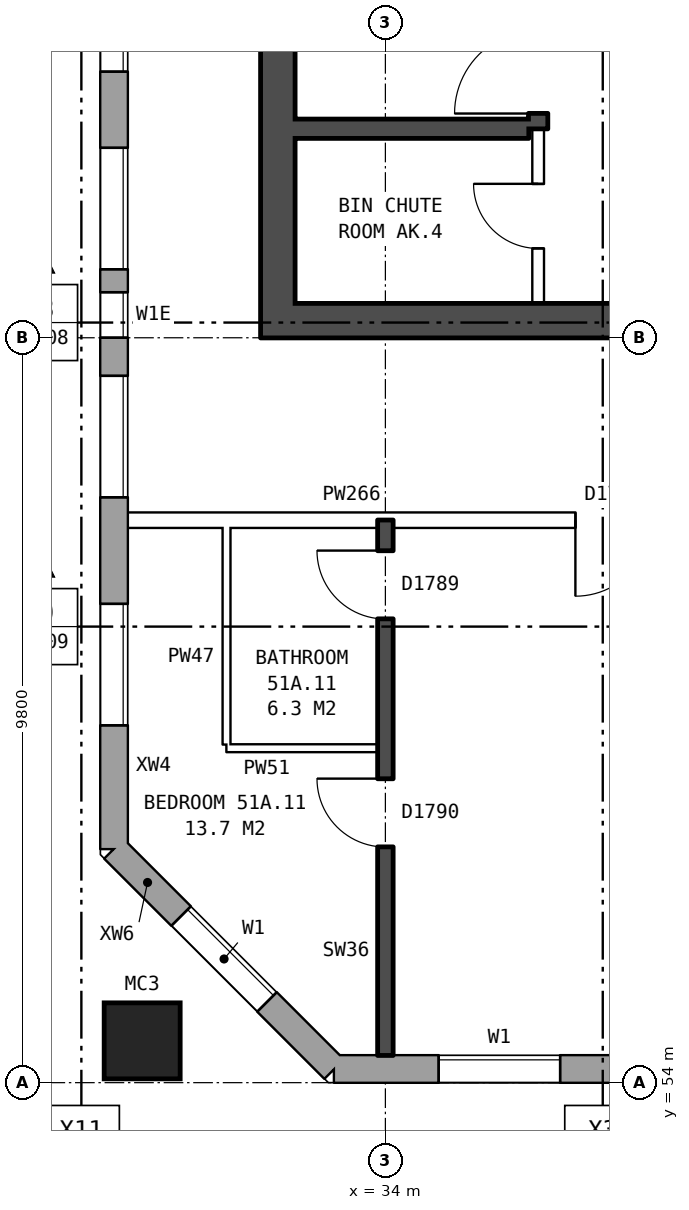
"""IFC4 building model, lengths in metres.
Left out: names, types, materials, properties, quantities, classifications, styles, units other than length and angle.
Written with IfcOpenShell. Run it as: python <this file> out.ifc"""

import sys

from ifc_helpers import new_model, si_unit, direction, frame, frame_2d, origin, origin_2d, place, context, subcontext, project, spatial, rectangle, hollow_rectangle, extrude, element, fill, save


model = new_model("IFC4")
c1 = context("Model", 3, precision=1e-05, world=origin(), true_north=direction((0.0, 1.0)))
c2 = subcontext(c1, "Body", "Model", "MODEL_VIEW")
j1 = project(units=[si_unit("LENGTHUNIT", "METRE"), si_unit("PLANEANGLEUNIT", "RADIAN")], contexts=[c1])
p1 = place(None, origin())
s1 = spatial("IfcSite", under=j1, at=p1, CompositionType="ELEMENT")
p2 = place(p1, origin())
s2 = spatial("IfcBuilding", under=s1, at=p2, CompositionType="ELEMENT")
p3 = place(p2, frame((0.0, 0.0, 182.0)))
s3 = spatial("IfcBuildingStorey", under=s2, at=p3, CompositionType="ELEMENT", Elevation=182.0)
p4 = place(p3, frame((30.8, 54.55, 0.0), z_axis=(0.0, 0.0, 1.0), x_axis=(1.0, 0.0, 0.0)))
e1 = element("IfcColumn", 1, at=p4, inside=s3, PredefinedType="COLUMN", context=c2, shape_type="SweptSolid", body=[
    extrude(hollow_rectangle(XDim=1.0, YDim=1.0, WallThickness=0.055, at=origin_2d()), origin(), (0.0, 0.0, 1.0), 3.1),
])
p5 = place(p3, frame((30.43, 57.075, 0.0), z_axis=(0.0, 0.0, 1.0), x_axis=(0.707106781187, -0.707106781187, 0.0)))
e2 = element("IfcWall", 2, at=p5, inside=s3, PredefinedType="STANDARD", context=c2, shape_type="SweptSolid", body=[
    extrude(rectangle(XDim=4.094, YDim=0.36, at=frame_2d((2.047, 0.0))), origin(), (0.0, 0.0, 1.0), 2.85),
])
p6 = place(p5, frame((1.247, 0.0, 0.8)))
e3 = element("IfcOpeningElement", 3, at=p6, cuts=e2, PredefinedType="OPENING", context=c2, shape_type="SweptSolid", body=[
    extrude(rectangle(XDim=1.6, YDim=1.8, at=frame_2d((0.8, 0.9))), frame((0.0, 0.19, 0.0), z_axis=(0.0, -1.0, 0.0), x_axis=(1.0, 0.0, 0.0)), (0.0, 0.0, 1.0), 0.38),
])
p7 = place(p3, frame((33.325, 54.18, 0.0), z_axis=(0.0, 0.0, 1.0), x_axis=(1.0, 0.0, 0.0)))
e4 = element("IfcWall", 4, at=p7, inside=s3, PredefinedType="STANDARD", context=c2, shape_type="SweptSolid", body=[
    extrude(rectangle(XDim=39.601, YDim=0.36, at=frame_2d((19.8, 0.0))), origin(), (0.0, 0.0, 1.0), 2.85),
])
p8 = place(p7, frame((1.375, 0.0, 0.8)))
e5 = element("IfcOpeningElement", 5, at=p8, cuts=e4, PredefinedType="OPENING", context=c2, shape_type="SweptSolid", body=[
    extrude(rectangle(XDim=1.6, YDim=1.8, at=frame_2d((0.8, 0.9))), frame((0.0, 0.19, 0.0), z_axis=(0.0, -1.0, 0.0), x_axis=(1.0, 0.0, 0.0)), (0.0, 0.0, 1.0), 0.38),
])
p9 = place(p7, frame((4.375, 0.0, 0.8)))
e6 = element("IfcOpeningElement", 6, at=p9, cuts=e4, PredefinedType="OPENING", context=c2, shape_type="SweptSolid", body=[
    extrude(rectangle(XDim=1.6, YDim=1.8, at=frame_2d((0.8, 0.9))), frame((0.0, 0.19, 0.0), z_axis=(0.0, -1.0, 0.0), x_axis=(1.0, 0.0, 0.0)), (0.0, 0.0, 1.0), 0.38),
])
p10 = place(p7, frame((6.875, 0.0, 0.8)))
e7 = element("IfcOpeningElement", 7, at=p10, cuts=e4, PredefinedType="OPENING", context=c2, shape_type="SweptSolid", body=[
    extrude(rectangle(XDim=1.0, YDim=1.8, at=frame_2d((0.5, 0.9))), frame((0.0, 0.19, 0.0), z_axis=(0.0, -1.0, 0.0), x_axis=(1.0, 0.0, 0.0)), (0.0, 0.0, 1.0), 0.38),
])
p11 = place(p7, frame((8.175, 0.0, 1.7)))
e8 = element("IfcOpeningElement", 8, at=p11, cuts=e4, PredefinedType="OPENING", context=c2, shape_type="SweptSolid", body=[
    extrude(rectangle(XDim=0.6, YDim=0.9, at=frame_2d((0.3, 0.45))), frame((0.0, 0.19, 0.0), z_axis=(0.0, -1.0, 0.0), x_axis=(1.0, 0.0, 0.0)), (0.0, 0.0, 1.0), 0.38),
])
p12 = place(p7, frame((13.375, 0.0, 0.8)))
e9 = element("IfcOpeningElement", 9, at=p12, cuts=e4, PredefinedType="OPENING", context=c2, shape_type="SweptSolid", body=[
    extrude(rectangle(XDim=1.6, YDim=1.8, at=frame_2d((0.8, 0.9))), frame((0.0, 0.19, 0.0), z_axis=(0.0, -1.0, 0.0), x_axis=(1.0, 0.0, 0.0)), (0.0, 0.0, 1.0), 0.38),
])
p13 = place(p7, frame((16.375, 0.0, 0.8)))
e10 = element("IfcOpeningElement", 10, at=p13, cuts=e4, PredefinedType="OPENING", context=c2, shape_type="SweptSolid", body=[
    extrude(rectangle(XDim=1.6, YDim=1.8, at=frame_2d((0.8, 0.9))), frame((0.0, 0.19, 0.0), z_axis=(0.0, -1.0, 0.0), x_axis=(1.0, 0.0, 0.0)), (0.0, 0.0, 1.0), 0.38),
])
p14 = place(p7, frame((19.375, 0.0, 0.8)))
e11 = element("IfcOpeningElement", 11, at=p14, cuts=e4, PredefinedType="OPENING", context=c2, shape_type="SweptSolid", body=[
    extrude(rectangle(XDim=1.6, YDim=1.8, at=frame_2d((0.8, 0.9))), frame((0.0, 0.19, 0.0), z_axis=(0.0, -1.0, 0.0), x_axis=(1.0, 0.0, 0.0)), (0.0, 0.0, 1.0), 0.38),
])
p15 = place(p7, frame((22.375, 0.0, 0.8)))
e12 = element("IfcOpeningElement", 12, at=p15, cuts=e4, PredefinedType="OPENING", context=c2, shape_type="SweptSolid", body=[
    extrude(rectangle(XDim=1.6, YDim=1.8, at=frame_2d((0.8, 0.9))), frame((0.0, 0.19, 0.0), z_axis=(0.0, -1.0, 0.0), x_axis=(1.0, 0.0, 0.0)), (0.0, 0.0, 1.0), 0.38),
])
p16 = place(p7, frame((25.375, 0.0, 0.8)))
e13 = element("IfcOpeningElement", 13, at=p16, cuts=e4, PredefinedType="OPENING", context=c2, shape_type="SweptSolid", body=[
    extrude(rectangle(XDim=1.6, YDim=1.8, at=frame_2d((0.8, 0.9))), frame((0.0, 0.19, 0.0), z_axis=(0.0, -1.0, 0.0), x_axis=(1.0, 0.0, 0.0)), (0.0, 0.0, 1.0), 0.38),
])
p17 = place(p7, frame((27.825, 0.0, 0.35)))
e14 = element("IfcOpeningElement", 14, at=p17, cuts=e4, PredefinedType="OPENING", context=c2, shape_type="SweptSolid", body=[
    extrude(rectangle(XDim=1.4, YDim=1.8, at=frame_2d((0.7, 0.9))), frame((0.0, 0.19, 0.0), z_axis=(0.0, -1.0, 0.0), x_axis=(1.0, 0.0, 0.0)), (0.0, 0.0, 1.0), 0.38),
])
p18 = place(p7, frame((31.375, 0.0, 0.8)))
e15 = element("IfcOpeningElement", 15, at=p18, cuts=e4, PredefinedType="OPENING", context=c2, shape_type="SweptSolid", body=[
    extrude(rectangle(XDim=1.6, YDim=1.8, at=frame_2d((0.8, 0.9))), frame((0.0, 0.19, 0.0), z_axis=(0.0, -1.0, 0.0), x_axis=(1.0, 0.0, 0.0)), (0.0, 0.0, 1.0), 0.38),
])
p19 = place(p7, frame((34.375, 0.0, 0.8)))
e16 = element("IfcOpeningElement", 16, at=p19, cuts=e4, PredefinedType="OPENING", context=c2, shape_type="SweptSolid", body=[
    extrude(rectangle(XDim=1.6, YDim=1.8, at=frame_2d((0.8, 0.9))), frame((0.0, 0.19, 0.0), z_axis=(0.0, -1.0, 0.0), x_axis=(1.0, 0.0, 0.0)), (0.0, 0.0, 1.0), 0.38),
])
p20 = place(p7, frame((37.375, 0.0, 0.8)))
e17 = element("IfcOpeningElement", 17, at=p20, cuts=e4, PredefinedType="OPENING", context=c2, shape_type="SweptSolid", body=[
    extrude(rectangle(XDim=1.6, YDim=1.8, at=frame_2d((0.8, 0.9))), frame((0.0, 0.19, 0.0), z_axis=(0.0, -1.0, 0.0), x_axis=(1.0, 0.0, 0.0)), (0.0, 0.0, 1.0), 0.38),
])
p21 = place(p7, frame((9.925, 0.0, 0.8)))
e18 = element("IfcOpeningElement", 18, at=p21, cuts=e4, PredefinedType="OPENING", context=c2, shape_type="SweptSolid", body=[
    extrude(rectangle(XDim=0.6, YDim=0.9, at=frame_2d((0.3, 0.45))), frame((0.0, 0.19, 0.0), z_axis=(0.0, -1.0, 0.0), x_axis=(1.0, 0.0, 0.0)), (0.0, 0.0, 1.0), 0.38),
])
p22 = place(p7, frame((10.875, 0.0, 0.8)))
e19 = element("IfcOpeningElement", 19, at=p22, cuts=e4, PredefinedType="OPENING", context=c2, shape_type="SweptSolid", body=[
    extrude(rectangle(XDim=1.6, YDim=1.8, at=frame_2d((0.8, 0.9))), frame((0.0, 0.19, 0.0), z_axis=(0.0, -1.0, 0.0), x_axis=(1.0, 0.0, 0.0)), (0.0, 0.0, 1.0), 0.38),
])
p23 = place(p7, frame((29.525, 0.0, 0.35)))
e20 = element("IfcOpeningElement", 20, at=p23, cuts=e4, PredefinedType="OPENING", context=c2, shape_type="SweptSolid", body=[
    extrude(rectangle(XDim=0.6, YDim=0.9, at=frame_2d((0.3, 0.45))), frame((0.0, 0.19, 0.0), z_axis=(0.0, -1.0, 0.0), x_axis=(1.0, 0.0, 0.0)), (0.0, 0.0, 1.0), 0.38),
])
p24 = place(p3, frame((30.43, 82.925, 0.0), z_axis=(0.0, 0.0, 1.0), x_axis=(0.0, -1.0, 0.0)))
e21 = element("IfcWall", 21, at=p24, inside=s3, PredefinedType="STANDARD", context=c2, shape_type="SweptSolid", body=[
    extrude(rectangle(XDim=25.851, YDim=0.36, at=frame_2d((12.925, 0.0))), origin(), (0.0, 0.0, 1.0), 2.85),
])
p25 = place(p24, frame((1.625, 0.0, 0.8)))
e22 = element("IfcOpeningElement", 22, at=p25, cuts=e21, PredefinedType="OPENING", context=c2, shape_type="SweptSolid", body=[
    extrude(rectangle(XDim=1.6, YDim=1.8, at=frame_2d((0.8, 0.9))), frame((0.0, 0.19, 0.0), z_axis=(0.0, -1.0, 0.0), x_axis=(1.0, 0.0, 0.0)), (0.0, 0.0, 1.0), 0.38),
])
p26 = place(p24, frame((4.625, 0.0, 0.8)))
e23 = element("IfcOpeningElement", 23, at=p26, cuts=e21, PredefinedType="OPENING", context=c2, shape_type="SweptSolid", body=[
    extrude(rectangle(XDim=1.6, YDim=1.8, at=frame_2d((0.8, 0.9))), frame((0.0, 0.19, 0.0), z_axis=(0.0, -1.0, 0.0), x_axis=(1.0, 0.0, 0.0)), (0.0, 0.0, 1.0), 0.38),
])
p27 = place(p24, frame((7.625, 0.0, 0.8)))
e24 = element("IfcOpeningElement", 24, at=p27, cuts=e21, PredefinedType="OPENING", context=c2, shape_type="SweptSolid", body=[
    extrude(rectangle(XDim=1.6, YDim=1.8, at=frame_2d((0.8, 0.9))), frame((0.0, 0.19, 0.0), z_axis=(0.0, -1.0, 0.0), x_axis=(1.0, 0.0, 0.0)), (0.0, 0.0, 1.0), 0.38),
])
p28 = place(p24, frame((6.525, 0.0, 0.8)))
e25 = element("IfcOpeningElement", 25, at=p28, cuts=e21, PredefinedType="OPENING", context=c2, shape_type="SweptSolid", body=[
    extrude(rectangle(XDim=0.8, YDim=1.8, at=frame_2d((0.4, 0.9))), frame((0.0, 0.19, 0.0), z_axis=(0.0, -1.0, 0.0), x_axis=(1.0, 0.0, 0.0)), (0.0, 0.0, 1.0), 0.38),
])
p29 = place(p24, frame((9.525, 0.0, 0.8)))
e26 = element("IfcOpeningElement", 26, at=p29, cuts=e21, PredefinedType="OPENING", context=c2, shape_type="SweptSolid", body=[
    extrude(rectangle(XDim=1.4, YDim=1.2, at=frame_2d((0.7, 0.6))), frame((0.0, 0.19, 0.0), z_axis=(0.0, -1.0, 0.0), x_axis=(1.0, 0.0, 0.0)), (0.0, 0.0, 1.0), 0.38),
])
p30 = place(p24, frame((16.625, 0.0, 0.8)))
e27 = element("IfcOpeningElement", 27, at=p30, cuts=e21, PredefinedType="OPENING", context=c2, shape_type="SweptSolid", body=[
    extrude(rectangle(XDim=1.6, YDim=1.8, at=frame_2d((0.8, 0.9))), frame((0.0, 0.19, 0.0), z_axis=(0.0, -1.0, 0.0), x_axis=(1.0, 0.0, 0.0)), (0.0, 0.0, 1.0), 0.38),
])
p31 = place(p24, frame((19.625, 0.0, 0.8)))
e28 = element("IfcOpeningElement", 28, at=p31, cuts=e21, PredefinedType="OPENING", context=c2, shape_type="SweptSolid", body=[
    extrude(rectangle(XDim=1.6, YDim=1.8, at=frame_2d((0.8, 0.9))), frame((0.0, 0.19, 0.0), z_axis=(0.0, -1.0, 0.0), x_axis=(1.0, 0.0, 0.0)), (0.0, 0.0, 1.0), 0.38),
])
p32 = place(p24, frame((22.625, 0.0, 0.8)))
e29 = element("IfcOpeningElement", 29, at=p32, cuts=e21, PredefinedType="OPENING", context=c2, shape_type="SweptSolid", body=[
    extrude(rectangle(XDim=1.6, YDim=1.8, at=frame_2d((0.8, 0.9))), frame((0.0, 0.19, 0.0), z_axis=(0.0, -1.0, 0.0), x_axis=(1.0, 0.0, 0.0)), (0.0, 0.0, 1.0), 0.38),
])
p33 = place(p24, frame((12.275, 0.0, 0.8)))
e30 = element("IfcOpeningElement", 30, at=p33, cuts=e21, PredefinedType="OPENING", context=c2, shape_type="SweptSolid", body=[
    extrude(rectangle(XDim=1.2, YDim=1.8, at=frame_2d((0.6, 0.9))), frame((0.0, 0.19, 0.0), z_axis=(0.0, -1.0, 0.0), x_axis=(1.0, 0.0, 0.0)), (0.0, 0.0, 1.0), 0.38),
])
p34 = place(p24, frame((14.425, 0.0, 0.8)))
e31 = element("IfcOpeningElement", 31, at=p34, cuts=e21, PredefinedType="OPENING", context=c2, shape_type="SweptSolid", body=[
    extrude(rectangle(XDim=1.2, YDim=0.9, at=frame_2d((0.6, 0.45))), frame((0.0, 0.19, 0.0), z_axis=(0.0, -1.0, 0.0), x_axis=(1.0, 0.0, 0.0)), (0.0, 0.0, 1.0), 0.38),
])
p35 = place(p24, frame((18.525, 0.0, 0.8)))
e32 = element("IfcOpeningElement", 32, at=p35, cuts=e21, PredefinedType="OPENING", context=c2, shape_type="SweptSolid", body=[
    extrude(rectangle(XDim=0.6, YDim=1.8, at=frame_2d((0.3, 0.9))), frame((0.0, 0.19, 0.0), z_axis=(0.0, -1.0, 0.0), x_axis=(1.0, 0.0, 0.0)), (0.0, 0.0, 1.0), 0.38),
])
p36 = place(p3, frame((32.585, 76.2, 0.0), z_axis=(0.0, 0.0, 1.0), x_axis=(0.0, -1.0, 0.0)))
e33 = element("IfcWall", 33, at=p36, inside=s3, PredefinedType="SHEAR", context=c2, shape_type="SweptSolid", body=[
    extrude(rectangle(XDim=12.4, YDim=0.45, at=frame_2d((6.2, 0.0))), origin(), (0.0, 0.0, 1.0), 2.85),
])
p37 = place(p3, frame((40.91, 64.025, 0.0), z_axis=(0.0, 0.0, 1.0), x_axis=(-1.0, 0.0, 0.0)))
e34 = element("IfcWall", 34, at=p37, inside=s3, PredefinedType="SHEAR", context=c2, shape_type="SweptSolid", body=[
    extrude(rectangle(XDim=8.1, YDim=0.45, at=frame_2d((4.05, 0.0))), origin(), (0.0, 0.0, 1.0), 2.85),
])
p38 = place(p3, frame((35.885, 66.55, 0.0), z_axis=(0.0, 0.0, 1.0), x_axis=(-1.0, 0.0, 0.0)))
e35 = element("IfcWall", 35, at=p38, inside=s3, PredefinedType="SHEAR", context=c2, shape_type="SweptSolid", body=[
    extrude(rectangle(XDim=3.075, YDim=0.25, at=frame_2d((1.538, 0.0))), origin(), (0.0, 0.0, 1.0), 2.85),
])
p39 = place(p3, frame((36.01, 73.775, 0.0), z_axis=(0.0, 0.0, 1.0), x_axis=(0.0, -1.0, 0.0)))
e36 = element("IfcWall", 36, at=p39, inside=s3, PredefinedType="SHEAR", context=c2, shape_type="SweptSolid", body=[
    extrude(rectangle(XDim=7.225, YDim=0.25, at=frame_2d((3.612, 0.0))), origin(), (0.0, 0.0, 1.0), 2.85),
])
p40 = place(p39, frame((5.925, 0.0, 0.0)))
e37 = element("IfcOpeningElement", 37, at=p40, cuts=e36, PredefinedType="OPENING", context=c2, shape_type="SweptSolid", body=[
    extrude(rectangle(XDim=1.1, YDim=2.1, at=frame_2d((0.55, 1.05))), frame((0.0, 0.135, 0.0), z_axis=(0.0, -1.0, 0.0), x_axis=(1.0, 0.0, 0.0)), (0.0, 0.0, 1.0), 0.27),
])
p41 = place(p3, frame((36.01, 66.55, 0.0), z_axis=(0.0, 0.0, 1.0), x_axis=(0.0, -1.0, 0.0)))
e38 = element("IfcWall", 38, at=p41, inside=s3, PredefinedType="PARTITIONING", context=c2, shape_type="SweptSolid", body=[
    extrude(rectangle(XDim=2.3, YDim=0.15, at=frame_2d((1.15, 0.0))), origin(), (0.0, 0.0, 1.0), 2.85),
])
p42 = place(p41, frame((0.725, 0.0, 0.0)))
e39 = element("IfcOpeningElement", 39, at=p42, cuts=e38, PredefinedType="OPENING", context=c2, shape_type="SweptSolid", body=[
    extrude(rectangle(XDim=0.85, YDim=2.1, at=frame_2d((0.425, 1.05))), frame((0.0, 0.085, 0.0), z_axis=(0.0, -1.0, 0.0), x_axis=(1.0, 0.0, 0.0)), (0.0, 0.0, 1.0), 0.17),
])
p43 = place(p3, frame((31.91, 58.4, 0.0), z_axis=(0.0, 0.0, 1.0), x_axis=(1.0, 0.0, 0.0)))
e40 = element("IfcWall", 40, at=p43, inside=s3, PredefinedType="PARTITIONING", context=c2, shape_type="SweptSolid", body=[
    extrude(rectangle(XDim=1.99, YDim=0.1, at=frame_2d((0.995, 0.0))), origin(), (0.0, 0.0, 1.0), 2.85),
])
p44 = place(p3, frame((30.61, 61.4, 0.0), z_axis=(0.0, 0.0, 1.0), x_axis=(1.0, 0.0, 0.0)))
e41 = element("IfcWall", 41, at=p44, inside=s3, PredefinedType="PARTITIONING", context=c2, shape_type="SweptSolid", body=[
    extrude(rectangle(XDim=15.29, YDim=0.2, at=frame_2d((7.645, 0.0))), origin(), (0.0, 0.0, 1.0), 2.85),
])
p45 = place(p44, frame((10.69, 0.0, 0.0)))
e42 = element("IfcOpeningElement", 42, at=p45, cuts=e41, PredefinedType="OPENING", context=c2, shape_type="SweptSolid", body=[
    extrude(rectangle(XDim=1.0, YDim=2.1, at=frame_2d((0.5, 1.05))), frame((0.0, 0.11, 0.0), z_axis=(0.0, -1.0, 0.0), x_axis=(1.0, 0.0, 0.0)), (0.0, 0.0, 1.0), 0.22),
])
p46 = place(p44, frame((5.89, 0.0, 0.0)))
e43 = element("IfcOpeningElement", 43, at=p46, cuts=e41, PredefinedType="OPENING", context=c2, shape_type="SweptSolid", body=[
    extrude(rectangle(XDim=1.0, YDim=2.1, at=frame_2d((0.5, 1.05))), frame((0.0, 0.11, 0.0), z_axis=(0.0, -1.0, 0.0), x_axis=(1.0, 0.0, 0.0)), (0.0, 0.0, 1.0), 0.22),
])
p47 = place(p3, frame((31.91, 58.45, 0.0), z_axis=(0.0, 0.0, 1.0), x_axis=(0.0, 1.0, 0.0)))
e44 = element("IfcWall", 44, at=p47, inside=s3, PredefinedType="PARTITIONING", context=c2, shape_type="SweptSolid", body=[
    extrude(rectangle(XDim=2.85, YDim=0.1, at=frame_2d((1.425, 0.0))), origin(), (0.0, 0.0, 1.0), 2.85),
])
p48 = place(p3, frame((34.0, 54.36, 0.0), z_axis=(0.0, 0.0, 1.0), x_axis=(0.0, 1.0, 0.0)))
e45 = element("IfcWall", 45, at=p48, inside=s3, PredefinedType="SOLIDWALL", context=c2, shape_type="SweptSolid", body=[
    extrude(rectangle(XDim=7.04, YDim=0.2, at=frame_2d((3.52, 0.0))), origin(), (0.0, 0.0, 1.0), 2.85),
])
p49 = place(p48, frame((2.74, 0.0, 0.0)))
e46 = element("IfcOpeningElement", 46, at=p49, cuts=e45, PredefinedType="OPENING", context=c2, shape_type="SweptSolid", body=[
    extrude(rectangle(XDim=0.9, YDim=2.1, at=frame_2d((0.45, 1.05))), frame((0.0, 0.11, 0.0), z_axis=(0.0, -1.0, 0.0), x_axis=(1.0, 0.0, 0.0)), (0.0, 0.0, 1.0), 0.22),
])
p50 = place(p48, frame((5.74, 0.0, 0.0)))
e47 = element("IfcOpeningElement", 47, at=p50, cuts=e45, PredefinedType="OPENING", context=c2, shape_type="SweptSolid", body=[
    extrude(rectangle(XDim=0.9, YDim=2.1, at=frame_2d((0.45, 1.05))), frame((0.0, 0.11, 0.0), z_axis=(0.0, -1.0, 0.0), x_axis=(1.0, 0.0, 0.0)), (0.0, 0.0, 1.0), 0.22),
])
p51 = place(p6, origin())
e48 = element("IfcWindow", 48, at=p51, inside=s3, PartitioningType="SINGLE_PANEL", PredefinedType="WINDOW", context=c2, shape_type="SweptSolid", body=[
    extrude(rectangle(XDim=1.6, YDim=1.8, at=frame_2d((0.8, 0.9))), frame((0.0, 0.15, 0.0), z_axis=(0.0, -1.0, 0.0), x_axis=(1.0, 0.0, 0.0)), (0.0, 0.0, 1.0), 0.06),
])
fill(e3, e48)
p52 = place(p8, origin())
e49 = element("IfcWindow", 49, at=p52, inside=s3, PartitioningType="SINGLE_PANEL", PredefinedType="WINDOW", context=c2, shape_type="SweptSolid", body=[
    extrude(rectangle(XDim=1.6, YDim=1.8, at=frame_2d((0.8, 0.9))), frame((0.0, 0.15, 0.0), z_axis=(0.0, -1.0, 0.0), x_axis=(1.0, 0.0, 0.0)), (0.0, 0.0, 1.0), 0.06),
])
fill(e5, e49)
p53 = place(p30, origin())
e50 = element("IfcWindow", 50, at=p53, inside=s3, PartitioningType="SINGLE_PANEL", PredefinedType="WINDOW", context=c2, shape_type="SweptSolid", body=[
    extrude(rectangle(XDim=1.6, YDim=1.8, at=frame_2d((0.8, 0.9))), frame((0.0, 0.15, 0.0), z_axis=(0.0, -1.0, 0.0), x_axis=(1.0, 0.0, 0.0)), (0.0, 0.0, 1.0), 0.06),
])
fill(e27, e50)
p54 = place(p31, origin())
e51 = element("IfcWindow", 51, at=p54, inside=s3, PartitioningType="SINGLE_PANEL", PredefinedType="WINDOW", context=c2, shape_type="SweptSolid", body=[
    extrude(rectangle(XDim=1.6, YDim=1.8, at=frame_2d((0.8, 0.9))), frame((0.0, 0.15, 0.0), z_axis=(0.0, -1.0, 0.0), x_axis=(1.0, 0.0, 0.0)), (0.0, 0.0, 1.0), 0.06),
])
fill(e28, e51)
p55 = place(p32, origin())
e52 = element("IfcWindow", 52, at=p55, inside=s3, PartitioningType="SINGLE_PANEL", PredefinedType="WINDOW", context=c2, shape_type="SweptSolid", body=[
    extrude(rectangle(XDim=1.6, YDim=1.8, at=frame_2d((0.8, 0.9))), frame((0.0, 0.15, 0.0), z_axis=(0.0, -1.0, 0.0), x_axis=(1.0, 0.0, 0.0)), (0.0, 0.0, 1.0), 0.06),
])
fill(e29, e52)
p56 = place(p40, frame((1.1, 0.0, 0.0), z_axis=(0.0, 0.0, 1.0), x_axis=(-1.0, 0.0, 0.0)))
e53 = element("IfcDoor", 53, at=p56, inside=s3, OperationType="SINGLE_SWING_LEFT", PredefinedType="DOOR", context=c2, shape_type="SweptSolid", body=[
    extrude(rectangle(XDim=1.1, YDim=2.1, at=frame_2d((0.55, 1.05))), frame((0.0, 0.025, 0.0), z_axis=(0.0, -1.0, 0.0), x_axis=(1.0, 0.0, 0.0)), (0.0, 0.0, 1.0), 0.05),
])
fill(e37, e53)
p57 = place(p42, frame((0.85, 0.0, 0.0), z_axis=(0.0, 0.0, 1.0), x_axis=(-1.0, 0.0, 0.0)))
e54 = element("IfcDoor", 54, at=p57, inside=s3, OperationType="SINGLE_SWING_RIGHT", PredefinedType="DOOR", context=c2, shape_type="SweptSolid", body=[
    extrude(rectangle(XDim=0.85, YDim=2.1, at=frame_2d((0.425, 1.05))), frame((0.0, 0.025, 0.0), z_axis=(0.0, -1.0, 0.0), x_axis=(1.0, 0.0, 0.0)), (0.0, 0.0, 1.0), 0.05),
])
fill(e39, e54)
p58 = place(p49, origin())
e55 = element("IfcDoor", 55, at=p58, inside=s3, OperationType="SINGLE_SWING_RIGHT", PredefinedType="DOOR", context=c2, shape_type="SweptSolid", body=[
    extrude(rectangle(XDim=0.9, YDim=2.1, at=frame_2d((0.45, 1.05))), frame((0.0, 0.025, 0.0), z_axis=(0.0, -1.0, 0.0), x_axis=(1.0, 0.0, 0.0)), (0.0, 0.0, 1.0), 0.05),
])
fill(e46, e55)
p59 = place(p46, frame((1.0, 0.0, 0.0), z_axis=(0.0, 0.0, 1.0), x_axis=(-1.0, 0.0, 0.0)))
e56 = element("IfcDoor", 56, at=p59, inside=s3, OperationType="SINGLE_SWING_RIGHT", PredefinedType="DOOR", context=c2, shape_type="SweptSolid", body=[
    extrude(rectangle(XDim=1.0, YDim=2.1, at=frame_2d((0.5, 1.05))), frame((0.0, 0.025, 0.0), z_axis=(0.0, -1.0, 0.0), x_axis=(1.0, 0.0, 0.0)), (0.0, 0.0, 1.0), 0.05),
])
fill(e43, e56)
p60 = place(p50, origin())
e57 = element("IfcDoor", 57, at=p60, inside=s3, OperationType="SINGLE_SWING_RIGHT", PredefinedType="DOOR", context=c2, shape_type="SweptSolid", body=[
    extrude(rectangle(XDim=0.9, YDim=2.1, at=frame_2d((0.45, 1.05))), frame((0.0, 0.025, 0.0), z_axis=(0.0, -1.0, 0.0), x_axis=(1.0, 0.0, 0.0)), (0.0, 0.0, 1.0), 0.05),
])
fill(e47, e57)
p61 = place(p34, origin())
e58 = element("IfcWindow", 58, at=p61, inside=s3, PartitioningType="SINGLE_PANEL", PredefinedType="WINDOW", context=c2, shape_type="SweptSolid", body=[
    extrude(rectangle(XDim=1.2, YDim=0.9, at=frame_2d((0.6, 0.45))), frame((0.0, 0.15, 0.0), z_axis=(0.0, -1.0, 0.0), x_axis=(1.0, 0.0, 0.0)), (0.0, 0.0, 1.0), 0.06),
])
fill(e31, e58)
p62 = place(p35, origin())
e59 = element("IfcWindow", 59, at=p62, inside=s3, PartitioningType="SINGLE_PANEL", PredefinedType="WINDOW", context=c2, shape_type="SweptSolid", body=[
    extrude(rectangle(XDim=0.6, YDim=1.8, at=frame_2d((0.3, 0.9))), frame((0.0, 0.15, 0.0), z_axis=(0.0, -1.0, 0.0), x_axis=(1.0, 0.0, 0.0)), (0.0, 0.0, 1.0), 0.06),
])
fill(e32, e59)
save(model, sys.argv[1])
